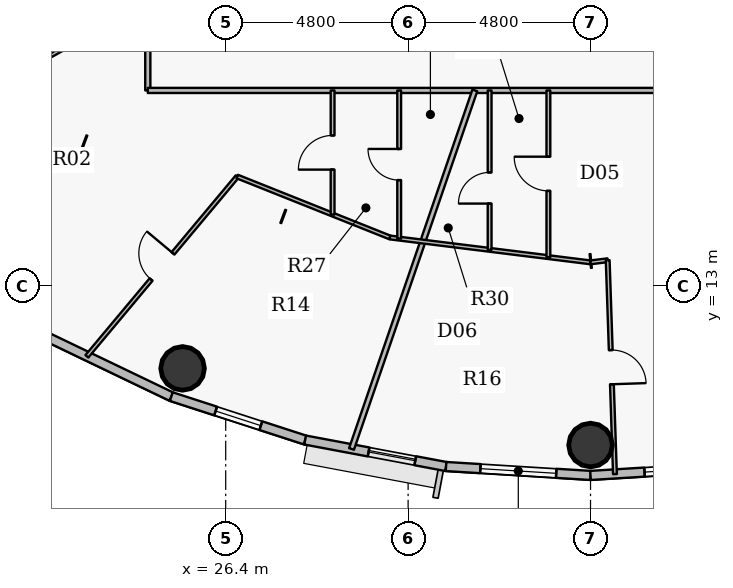
"""IFC4 building model, lengths in metres.
Left out: names, types, materials, properties, quantities, classifications, styles, units other than length and angle.
Written with IfcOpenShell. Run it as: python <this file> out.ifc"""

import sys

from ifc_helpers import new_model, si_unit, direction, frame, frame_2d, origin, origin_2d, place, context, subcontext, project, spatial, rectangle, hollow_circle, extrude, source, transform, mapped, element, fill, save


model = new_model("IFC4")
c1 = context("Model", 3, precision=1e-05, world=origin(), true_north=direction((0.0, 1.0)))
c2 = subcontext(c1, "Body", "Model", "MODEL_VIEW")
j1 = project(units=[si_unit("LENGTHUNIT", "METRE"), si_unit("PLANEANGLEUNIT", "RADIAN")], contexts=[c1])
p1 = place(None, origin())
s1 = spatial("IfcSite", under=j1, at=p1, CompositionType="ELEMENT")
p2 = place(p1, origin())
s2 = spatial("IfcBuilding", under=s1, at=p2, CompositionType="ELEMENT")
p3 = place(p2, frame((0.0, 0.0, 232.8)))
s3 = spatial("IfcBuildingStorey", under=s2, at=p3, CompositionType="ELEMENT", Elevation=232.8)
for number, where, z_axis, x_axis in (
    (1, (25.265, 10.836, 0.0), (0.0, 0.0, 1.0), (1.0, 0.0, 0.0)),
    (2, (36.0, 8.82, 0.0), (0.0, 0.0, 1.0), (1.0, 0.0, 0.0)),
):
    element("IfcColumn", number, at=place(p3, frame(where, z_axis=z_axis, x_axis=x_axis)), inside=s3, PredefinedType="COLUMN", context=c2, shape_type="SweptSolid", body=[
        extrude(hollow_circle(Radius=0.575, WallThickness=0.036, at=origin_2d()), origin(), (0.0, 0.0, 1.0), 3.75),
    ])
p4 = place(p3, frame((24.969, 10.094, 0.0), z_axis=(0.0, 0.0, 1.0), x_axis=(-0.901598104751, 0.432574684313, 0.0)))
e3 = element("IfcWall", 3, at=p4, inside=s3, PredefinedType="SOLIDWALL", context=c2, shape_type="SweptSolid", body=[
    extrude(rectangle(XDim=3.604, YDim=0.24, at=frame_2d((1.802, 0.0))), origin(), (0.0, 0.0, 1.0), 3.5),
])
p5 = place(p3, frame((28.491, 8.951, 0.0), z_axis=(0.0, 0.0, 1.0), x_axis=(-0.951210789182, 0.308541787354, 0.0)))
e4 = element("IfcWall", 4, at=p5, inside=s3, PredefinedType="SOLIDWALL", context=c2, shape_type="SweptSolid", body=[
    extrude(rectangle(XDim=3.702, YDim=0.24, at=frame_2d((1.851, 0.0))), origin(), (0.0, 0.0, 1.0), 3.5),
])
p6 = place(p5, frame((1.226, 0.0, 0.9)))
e5 = element("IfcOpeningElement", 5, at=p6, cuts=e4, PredefinedType="OPENING", context=c2, shape_type="SweptSolid", body=[
    extrude(rectangle(XDim=1.25, YDim=1.65, at=origin_2d()), frame((0.625, 0.13, 0.825), z_axis=(0.0, -1.0, 0.0), x_axis=(1.0, 0.0, 0.0)), (0.0, 0.0, 1.0), 0.26),
])
p7 = place(p3, frame((32.198, 8.254, 0.0), z_axis=(0.0, 0.0, 1.0), x_axis=(-0.982784898575, 0.184753465822, 0.0)))
e6 = element("IfcWall", 6, at=p7, inside=s3, PredefinedType="SOLIDWALL", context=c2, shape_type="SweptSolid", body=[
    extrude(rectangle(XDim=3.773, YDim=0.24, at=frame_2d((1.886, 0.0))), origin(), (0.0, 0.0, 1.0), 3.5),
])
p8 = place(p7, frame((0.824, 0.0, 0.9)))
e7 = element("IfcOpeningElement", 7, at=p8, cuts=e6, PredefinedType="OPENING", context=c2, shape_type="SweptSolid", body=[
    extrude(rectangle(XDim=1.25, YDim=1.65, at=origin_2d()), frame((0.625, 0.13, 0.825), z_axis=(0.0, -1.0, 0.0), x_axis=(1.0, 0.0, 0.0)), (0.0, 0.0, 1.0), 0.26),
])
p9 = place(p3, frame((36.0, 8.02, 0.0), z_axis=(0.0, 0.0, 1.0), x_axis=(-0.998108785312, 0.06147237333, 0.0)))
e8 = element("IfcWall", 8, at=p9, inside=s3, PredefinedType="SOLIDWALL", context=c2, shape_type="SweptSolid", body=[
    extrude(rectangle(XDim=3.809, YDim=0.24, at=frame_2d((1.904, 0.0))), origin(), (0.0, 0.0, 1.0), 3.5),
])
p10 = place(p9, frame((0.904, 0.0, 0.9)))
e9 = element("IfcOpeningElement", 9, at=p10, cuts=e8, PredefinedType="OPENING", context=c2, shape_type="SweptSolid", body=[
    extrude(rectangle(XDim=2.0, YDim=1.75, at=origin_2d()), frame((1.0, 0.13, 0.875), z_axis=(0.0, -1.0, 0.0), x_axis=(1.0, 0.0, 0.0)), (0.0, 0.0, 1.0), 0.26),
])
p11 = place(p3, frame((39.802, 8.254, 0.0), z_axis=(0.0, 0.0, 1.0), x_axis=(-0.998108785312, -0.06147237333, 0.0)))
e10 = element("IfcWall", 10, at=p11, inside=s3, PredefinedType="SOLIDWALL", context=c2, shape_type="SweptSolid", body=[
    extrude(rectangle(XDim=3.809, YDim=0.24, at=frame_2d((1.904, 0.0))), origin(), (0.0, 0.0, 1.0), 3.5),
])
p12 = place(p11, frame((0.785, 0.0, 0.9)))
e11 = element("IfcOpeningElement", 11, at=p12, cuts=e10, PredefinedType="OPENING", context=c2, shape_type="SweptSolid", body=[
    extrude(rectangle(XDim=1.6, YDim=1.75, at=origin_2d()), frame((0.8, 0.13, 0.875), z_axis=(0.0, -1.0, 0.0), x_axis=(1.0, 0.0, 0.0)), (0.0, 0.0, 1.0), 0.26),
])
p13 = place(p3, frame((16.25, 15.977, 0.0), z_axis=(0.0, 0.0, 1.0), x_axis=(0.87319302211, 0.487374543999, 0.0)))
e12 = element("IfcWall", 12, at=p13, inside=s3, PredefinedType="PARTITIONING", context=c2, shape_type="SweptSolid", body=[
    extrude(rectangle(XDim=6.712, YDim=0.1, at=frame_2d((3.356, 0.0))), origin(), (0.0, 0.0, 1.0), 2.985),
])
p14 = place(p13, frame((2.906, 0.0, 0.0)))
e13 = element("IfcOpeningElement", 13, at=p14, cuts=e12, PredefinedType="OPENING", context=c2, shape_type="SweptSolid", body=[
    extrude(rectangle(XDim=0.9, YDim=2.1, at=origin_2d()), frame((0.45, 0.06, 1.05), z_axis=(0.0, -1.0, 0.0), x_axis=(1.0, 0.0, 0.0)), (0.0, 0.0, 1.0), 0.12),
])
p15 = place(p3, frame((22.747, 11.154, 0.0), z_axis=(0.0, 0.0, 1.0), x_axis=(0.641565789242, 0.767068013982, 0.0)))
e14 = element("IfcWall", 14, at=p15, inside=s3, PredefinedType="PARTITIONING", context=c2, shape_type="SweptSolid", body=[
    extrude(rectangle(XDim=6.167, YDim=0.1, at=frame_2d((3.083, 0.0))), origin(), (0.0, 0.0, 1.0), 2.985),
])
p16 = place(p15, frame((2.633, 0.0, 0.0)))
e15 = element("IfcOpeningElement", 15, at=p16, cuts=e14, PredefinedType="OPENING", context=c2, shape_type="SweptSolid", body=[
    extrude(rectangle(XDim=0.9, YDim=2.1, at=origin_2d()), frame((0.45, 0.06, 1.05), z_axis=(0.0, -1.0, 0.0), x_axis=(1.0, 0.0, 0.0)), (0.0, 0.0, 1.0), 0.12),
])
p17 = place(p3, frame((24.35, 18.15, 0.0), z_axis=(0.0, 0.0, 1.0), x_axis=(0.0, 1.0, 0.0)))
e16 = element("IfcWall", 16, at=p17, inside=s3, PredefinedType="PARTITIONING", context=c2, shape_type="SweptSolid", body=[
    extrude(rectangle(XDim=7.163, YDim=0.135, at=frame_2d((3.581, 0.0))), origin(), (0.0, 0.0, 1.0), 2.935),
])
p18 = place(p17, frame((3.081, 0.0, 0.0)))
e17 = element("IfcOpeningElement", 17, at=p18, cuts=e16, PredefinedType="OPENING", context=c2, shape_type="SweptSolid", body=[
    extrude(rectangle(XDim=1.0, YDim=2.15, at=origin_2d()), frame((0.5, 0.078, 1.075), z_axis=(0.0, -1.0, 0.0), x_axis=(1.0, 0.0, 0.0)), (0.0, 0.0, 1.0), 0.155),
])
p19 = place(p3, frame((24.35, 18.15, 0.0), z_axis=(0.0, 0.0, 1.0), x_axis=(1.0, 0.0, 0.0)))
e18 = element("IfcWall", 18, at=p19, inside=s3, PredefinedType="PARTITIONING", context=c2, shape_type="SweptSolid", body=[
    extrude(rectangle(XDim=23.85, YDim=0.135, at=frame_2d((11.925, 0.0))), origin(), (0.0, 0.0, 1.0), 2.935),
])
p20 = place(p19, frame((14.838, 0.0, 0.0)))
e19 = element("IfcOpeningElement", 19, at=p20, cuts=e18, PredefinedType="OPENING", context=c2, shape_type="SweptSolid", body=[
    extrude(rectangle(XDim=1.0, YDim=2.15, at=origin_2d()), frame((0.5, 0.078, 1.075), z_axis=(0.0, -1.0, 0.0), x_axis=(1.0, 0.0, 0.0)), (0.0, 0.0, 1.0), 0.155),
])
p21 = place(p19, frame((21.472, 0.0, 0.0)))
e20 = element("IfcOpeningElement", 20, at=p21, cuts=e18, PredefinedType="OPENING", context=c2, shape_type="SweptSolid", body=[
    extrude(rectangle(XDim=1.0, YDim=2.15, at=origin_2d()), frame((0.5, 0.078, 1.075), z_axis=(0.0, -1.0, 0.0), x_axis=(1.0, 0.0, 0.0)), (0.0, 0.0, 1.0), 0.155),
])
p22 = place(p3, frame((26.703, 15.884, 0.0), z_axis=(0.0, 0.0, 1.0), x_axis=(0.928807108231, -0.370563564991, 0.0)))
e21 = element("IfcWall", 21, at=p22, inside=s3, PredefinedType="PARTITIONING", context=c2, shape_type="SweptSolid", body=[
    extrude(rectangle(XDim=4.327, YDim=0.1, at=frame_2d((2.163, 0.0))), origin(), (0.0, 0.0, 1.0), 2.935),
])
p23 = place(p3, frame((29.213, 14.883, 0.0), z_axis=(0.0, 0.0, 1.0), x_axis=(0.0, 1.0, 0.0)))
e22 = element("IfcWall", 22, at=p23, inside=s3, PredefinedType="PARTITIONING", context=c2, shape_type="SweptSolid", body=[
    extrude(rectangle(XDim=3.267, YDim=0.1, at=frame_2d((1.633, 0.0))), origin(), (0.0, 0.0, 1.0), 2.935),
])
p24 = place(p23, frame((1.183, 0.0, 0.0)))
e23 = element("IfcOpeningElement", 23, at=p24, cuts=e22, PredefinedType="OPENING", context=c2, shape_type="SweptSolid", body=[
    extrude(rectangle(XDim=0.9, YDim=2.1, at=origin_2d()), frame((0.45, 0.06, 1.05), z_axis=(0.0, -1.0, 0.0), x_axis=(1.0, 0.0, 0.0)), (0.0, 0.0, 1.0), 0.12),
])
p25 = place(p3, frame((29.711, 8.717, 0.0), z_axis=(0.0, 0.0, 1.0), x_axis=(0.325280852175, 0.945617452889, 0.0)))
e24 = element("IfcWall", 24, at=p25, inside=s3, PredefinedType="PARTITIONING", context=c2, shape_type="SweptSolid", body=[
    extrude(rectangle(XDim=9.976, YDim=0.135, at=frame_2d((4.988, 0.0))), origin(), (0.0, 0.0, 1.0), 2.985),
])
p26 = place(p3, frame((30.722, 14.281, 0.0), z_axis=(0.0, 0.0, 1.0), x_axis=(0.992398864395, -0.123062967412, 0.0)))
e25 = element("IfcWall", 25, at=p26, inside=s3, PredefinedType="PARTITIONING", context=c2, shape_type="SweptSolid", body=[
    extrude(rectangle(XDim=5.319, YDim=0.1, at=frame_2d((2.659, 0.0))), origin(), (0.0, 0.0, 1.0), 2.935),
])
p27 = place(p3, frame((30.965, 14.251, 0.0), z_axis=(0.0, 0.0, 1.0), x_axis=(0.0, 1.0, 0.0)))
e26 = element("IfcWall", 26, at=p27, inside=s3, PredefinedType="PARTITIONING", context=c2, shape_type="SweptSolid", body=[
    extrude(rectangle(XDim=3.899, YDim=0.1, at=frame_2d((1.949, 0.0))), origin(), (0.0, 0.0, 1.0), 3.5),
])
p28 = place(p27, frame((1.54, 0.0, 0.0)))
e27 = element("IfcOpeningElement", 27, at=p28, cuts=e26, PredefinedType="OPENING", context=c2, shape_type="SweptSolid", body=[
    extrude(rectangle(XDim=0.82, YDim=2.1, at=origin_2d()), frame((0.41, 0.06, 1.05), z_axis=(0.0, -1.0, 0.0), x_axis=(1.0, 0.0, 0.0)), (0.0, 0.0, 1.0), 0.12),
])
p29 = place(p3, frame((33.345, 13.956, 0.0), z_axis=(0.0, 0.0, 1.0), x_axis=(0.0, 1.0, 0.0)))
e28 = element("IfcWall", 28, at=p29, inside=s3, PredefinedType="PARTITIONING", context=c2, shape_type="SweptSolid", body=[
    extrude(rectangle(XDim=4.194, YDim=0.1, at=frame_2d((2.097, 0.0))), origin(), (0.0, 0.0, 1.0), 3.5),
])
p30 = place(p29, frame((1.217, 0.0, 0.0)))
e29 = element("IfcOpeningElement", 29, at=p30, cuts=e28, PredefinedType="OPENING", context=c2, shape_type="SweptSolid", body=[
    extrude(rectangle(XDim=0.82, YDim=2.1, at=origin_2d()), frame((0.41, 0.06, 1.05), z_axis=(0.0, -1.0, 0.0), x_axis=(1.0, 0.0, 0.0)), (0.0, 0.0, 1.0), 0.12),
])
p31 = place(p3, frame((34.891, 13.764, 0.0), z_axis=(0.0, 0.0, 1.0), x_axis=(0.0, 1.0, 0.0)))
e30 = element("IfcWall", 30, at=p31, inside=s3, PredefinedType="PARTITIONING", context=c2, shape_type="SweptSolid", body=[
    extrude(rectangle(XDim=4.386, YDim=0.1, at=frame_2d((2.193, 0.0))), origin(), (0.0, 0.0, 1.0), 3.5),
])
p32 = place(p31, frame((1.743, 0.0, 0.0)))
e31 = element("IfcOpeningElement", 31, at=p32, cuts=e30, PredefinedType="OPENING", context=c2, shape_type="SweptSolid", body=[
    extrude(rectangle(XDim=0.9, YDim=2.1, at=origin_2d()), frame((0.45, 0.06, 1.05), z_axis=(0.0, -1.0, 0.0), x_axis=(1.0, 0.0, 0.0)), (0.0, 0.0, 1.0), 0.12),
])
p33 = place(p3, frame((36.0, 13.626, 0.0), z_axis=(0.0, 0.0, 1.0), x_axis=(0.992368340182, 0.123308869931, 0.0)))
e32 = element("IfcWall", 32, at=p33, inside=s3, PredefinedType="PARTITIONING", context=c2, shape_type="SweptSolid", body=[
    extrude(rectangle(XDim=0.455, YDim=0.1, at=frame_2d((0.228, 0.0))), origin(), (0.0, 0.0, 1.0), 2.935),
])
p34 = place(p3, frame((36.452, 13.683, 0.0), z_axis=(0.0, 0.0, 1.0), x_axis=(0.033903801357, -0.999425100872, 0.0)))
e33 = element("IfcWall", 33, at=p34, inside=s3, PredefinedType="PARTITIONING", context=c2, shape_type="SweptSolid", body=[
    extrude(rectangle(XDim=5.631, YDim=0.1, at=frame_2d((2.815, 0.0))), origin(), (0.0, 0.0, 1.0), 2.985),
])
p35 = place(p34, frame((2.365, 0.0, 0.0)))
e34 = element("IfcOpeningElement", 34, at=p35, cuts=e33, PredefinedType="OPENING", context=c2, shape_type="SweptSolid", body=[
    extrude(rectangle(XDim=0.9, YDim=2.1, at=origin_2d()), frame((0.45, 0.06, 1.05), z_axis=(0.0, -1.0, 0.0), x_axis=(1.0, 0.0, 0.0)), (0.0, 0.0, 1.0), 0.12),
])
m1 = source(origin(), c2, "Body", "SweptSolid", [
    extrude(rectangle(XDim=1.25, YDim=1.65, at=origin_2d()), frame((0.625, 0.03, 0.825), z_axis=(0.0, -1.0, 0.0), x_axis=(1.0, 0.0, 0.0)), (0.0, 0.0, 1.0), 0.06),
])
p36 = place(p8, origin())
e35 = element("IfcWindow", 35, at=p36, inside=s3, PartitioningType="SINGLE_PANEL", PredefinedType="WINDOW", context=c2, shape_type="MappedRepresentation", body=[
    mapped(m1, transform((0.0, 0.0, 0.0), x_axis=(1.0, 0.0, 0.0), y_axis=(0.0, 1.0, 0.0), z_axis=(0.0, 0.0, 1.0), scale=1.0)),
])
fill(e7, e35)
m2 = source(origin(), c2, "Body", "SweptSolid", [
    extrude(rectangle(XDim=2.0, YDim=1.75, at=origin_2d()), frame((1.0, 0.03, 0.875), z_axis=(0.0, -1.0, 0.0), x_axis=(1.0, 0.0, 0.0)), (0.0, 0.0, 1.0), 0.06),
])
p37 = place(p10, origin())
e36 = element("IfcWindow", 36, at=p37, inside=s3, PartitioningType="DOUBLE_PANEL_VERTICAL", PredefinedType="WINDOW", context=c2, shape_type="MappedRepresentation", body=[
    mapped(m2, transform((0.0, 0.0, 0.0), x_axis=(1.0, 0.0, 0.0), y_axis=(0.0, 1.0, 0.0), z_axis=(0.0, 0.0, 1.0), scale=1.0)),
])
fill(e9, e36)
m3 = source(origin(), c2, "Body", "SweptSolid", [
    extrude(rectangle(XDim=1.6, YDim=1.75, at=origin_2d()), frame((0.8, 0.03, 0.875), z_axis=(0.0, -1.0, 0.0), x_axis=(1.0, 0.0, 0.0)), (0.0, 0.0, 1.0), 0.06),
])
p38 = place(p12, origin())
e37 = element("IfcWindow", 37, at=p38, inside=s3, PartitioningType="DOUBLE_PANEL_VERTICAL", PredefinedType="WINDOW", context=c2, shape_type="MappedRepresentation", body=[
    mapped(m3, transform((0.0, 0.0, 0.0), x_axis=(1.0, 0.0, 0.0), y_axis=(0.0, 1.0, 0.0), z_axis=(0.0, 0.0, 1.0), scale=1.0)),
])
fill(e11, e37)
p39 = place(p6, origin())
e38 = element("IfcWindow", 38, at=p39, inside=s3, PartitioningType="SINGLE_PANEL", PredefinedType="WINDOW", context=c2, shape_type="MappedRepresentation", body=[
    mapped(m1, transform((0.0, 0.0, 0.0), x_axis=(1.0, 0.0, 0.0), y_axis=(0.0, 1.0, 0.0), z_axis=(0.0, 0.0, 1.0), scale=1.0)),
])
fill(e5, e38)
m4 = source(origin(), c2, "Body", "SweptSolid", [
    extrude(rectangle(XDim=0.9, YDim=2.1, at=origin_2d()), frame((0.45, 0.025, 1.05), z_axis=(0.0, -1.0, 0.0), x_axis=(1.0, 0.0, 0.0)), (0.0, 0.0, 1.0), 0.05),
])
p40 = place(p16, origin())
e39 = element("IfcDoor", 39, at=p40, inside=s3, OperationType="SINGLE_SWING_RIGHT", PredefinedType="DOOR", context=c2, shape_type="MappedRepresentation", body=[
    mapped(m4, transform((0.0, 0.0, 0.0), x_axis=(1.0, 0.0, 0.0), y_axis=(0.0, 1.0, 0.0), z_axis=(0.0, 0.0, 1.0), scale=1.0)),
])
fill(e15, e39)
p41 = place(p24, origin())
e40 = element("IfcDoor", 40, at=p41, inside=s3, OperationType="SINGLE_SWING_LEFT", PredefinedType="DOOR", context=c2, shape_type="MappedRepresentation", body=[
    mapped(m4, transform((0.0, 0.0, 0.0), x_axis=(1.0, 0.0, 0.0), y_axis=(0.0, 1.0, 0.0), z_axis=(0.0, 0.0, 1.0), scale=1.0)),
])
fill(e23, e40)
m5 = source(origin(), c2, "Body", "SweptSolid", [
    extrude(rectangle(XDim=0.82, YDim=2.1, at=origin_2d()), frame((0.41, 0.025, 1.05), z_axis=(0.0, -1.0, 0.0), x_axis=(1.0, 0.0, 0.0)), (0.0, 0.0, 1.0), 0.05),
])
p42 = place(p28, origin())
e41 = element("IfcDoor", 41, at=p42, inside=s3, OperationType="SINGLE_SWING_RIGHT", PredefinedType="DOOR", context=c2, shape_type="MappedRepresentation", body=[
    mapped(m5, transform((0.0, 0.0, 0.0), x_axis=(1.0, 0.0, 0.0), y_axis=(0.0, 1.0, 0.0), z_axis=(0.0, 0.0, 1.0), scale=1.0)),
])
fill(e27, e41)
p43 = place(p35, origin())
e42 = element("IfcDoor", 42, at=p43, inside=s3, OperationType="SINGLE_SWING_RIGHT", PredefinedType="DOOR", context=c2, shape_type="MappedRepresentation", body=[
    mapped(m4, transform((0.0, 0.0, 0.0), x_axis=(1.0, 0.0, 0.0), y_axis=(0.0, 1.0, 0.0), z_axis=(0.0, 0.0, 1.0), scale=1.0)),
])
fill(e34, e42)
p44 = place(p32, origin())
e43 = element("IfcDoor", 43, at=p44, inside=s3, OperationType="SINGLE_SWING_RIGHT", PredefinedType="DOOR", context=c2, shape_type="MappedRepresentation", body=[
    mapped(m4, transform((0.0, 0.0, 0.0), x_axis=(1.0, 0.0, 0.0), y_axis=(0.0, 1.0, 0.0), z_axis=(0.0, 0.0, 1.0), scale=1.0)),
])
fill(e31, e43)
p45 = place(p30, origin())
e44 = element("IfcDoor", 44, at=p45, inside=s3, OperationType="SINGLE_SWING_LEFT", PredefinedType="DOOR", context=c2, shape_type="MappedRepresentation", body=[
    mapped(m5, transform((0.0, 0.0, 0.0), x_axis=(1.0, 0.0, 0.0), y_axis=(0.0, 1.0, 0.0), z_axis=(0.0, 0.0, 1.0), scale=1.0)),
])
fill(e29, e44)
save(model, sys.argv[1])
